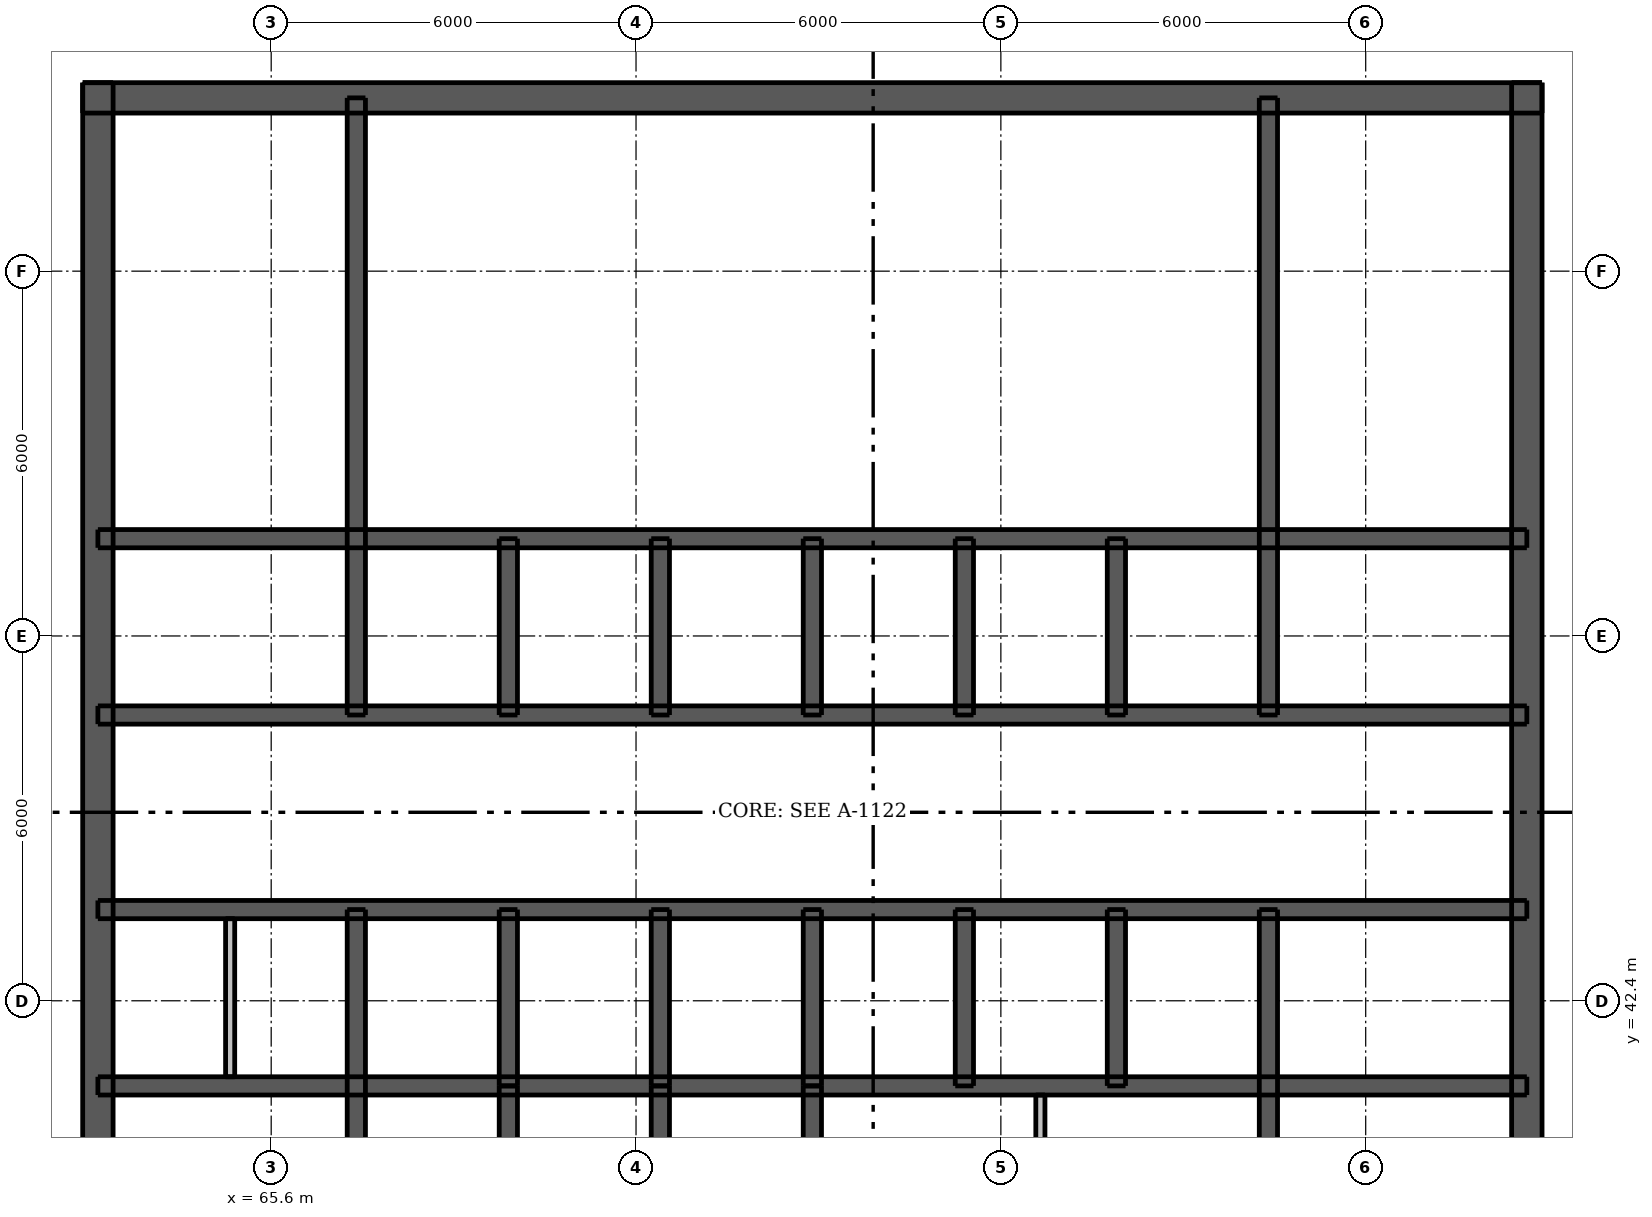
"""IFC4 building model, lengths in metres.
Left out: names, types, materials, properties, quantities, classifications, styles, units other than length and angle.
Written with IfcOpenShell. Run it as: python <this file> out.ifc"""

import sys

from ifc_helpers import new_model, si_unit, direction, frame, frame_2d, origin, place, context, subcontext, project, spatial, rectangle, extrude, element, fill, save


model = new_model("IFC4")
c1 = context("Model", 3, precision=1e-05, world=origin(), true_north=direction((0.0, 1.0)))
c2 = subcontext(c1, "Body", "Model", "MODEL_VIEW")
j1 = project(units=[si_unit("LENGTHUNIT", "METRE"), si_unit("PLANEANGLEUNIT", "RADIAN")], contexts=[c1])
p1 = place(None, origin())
s1 = spatial("IfcSite", under=j1, at=p1, CompositionType="ELEMENT")
p2 = place(p1, origin())
s2 = spatial("IfcBuilding", under=s1, at=p2, CompositionType="ELEMENT")
p3 = place(p2, frame((0.0, 0.0, 281.8)))
s3 = spatial("IfcBuildingStorey", under=s2, at=p3, CompositionType="ELEMENT", Elevation=281.8)
p4 = place(p3, frame((62.5, 57.25, 0.0), z_axis=(0.0, 0.0, 1.0), x_axis=(1.0, 0.0, 0.0)))
e1 = element("IfcWall", 1, at=p4, inside=s3, PredefinedType="SHEAR", context=c2, shape_type="SweptSolid", body=[
    extrude(rectangle(XDim=24.0, YDim=0.5, at=frame_2d((12.0, 0.0))), origin(), (0.0, 0.0, 1.0), 4.2),
])
p5 = place(p4, frame((21.025, 0.0, 0.0)))
e2 = element("IfcOpeningElement", 2, at=p5, cuts=e1, PredefinedType="OPENING", context=c2, shape_type="SweptSolid", body=[
    extrude(rectangle(XDim=1.1, YDim=2.1, at=frame_2d((0.55, 1.05))), frame((0.0, 0.26, 0.0), z_axis=(0.0, -1.0, 0.0), x_axis=(1.0, 0.0, 0.0)), (0.0, 0.0, 1.0), 0.52),
])
p6 = place(p4, frame((1.875, 0.0, 0.0)))
e3 = element("IfcOpeningElement", 3, at=p6, cuts=e1, PredefinedType="OPENING", context=c2, shape_type="SweptSolid", body=[
    extrude(rectangle(XDim=1.1, YDim=2.1, at=frame_2d((0.55, 1.05))), frame((0.0, 0.26, 0.0), z_axis=(0.0, -1.0, 0.0), x_axis=(1.0, 0.0, 0.0)), (0.0, 0.0, 1.0), 0.52),
])
p7 = place(p4, frame((11.55, 0.0, 0.0)))
e4 = element("IfcOpeningElement", 4, at=p7, cuts=e1, PredefinedType="OPENING", context=c2, shape_type="SweptSolid", body=[
    extrude(rectangle(XDim=0.9, YDim=2.1, at=frame_2d((0.45, 1.05))), frame((0.0, 0.26, 0.0), z_axis=(0.0, -1.0, 0.0), x_axis=(1.0, 0.0, 0.0)), (0.0, 0.0, 1.0), 0.52),
])
p8 = place(p3, frame((62.75, 33.5, 0.0), z_axis=(0.0, 0.0, 1.0), x_axis=(0.0, 1.0, 0.0)))
e5 = element("IfcWall", 5, at=p8, inside=s3, PredefinedType="SHEAR", context=c2, shape_type="SweptSolid", body=[
    extrude(rectangle(XDim=24.0, YDim=0.5, at=frame_2d((12.0, 0.0))), origin(), (0.0, 0.0, 1.0), 4.2),
])
p9 = place(p8, frame((11.2, 0.0, 0.0)))
e6 = element("IfcOpeningElement", 6, at=p9, cuts=e5, PredefinedType="OPENING", context=c2, shape_type="SweptSolid", body=[
    extrude(rectangle(XDim=1.6, YDim=2.1, at=frame_2d((0.8, 1.05))), frame((0.0, 0.26, 0.0), z_axis=(0.0, -1.0, 0.0), x_axis=(1.0, 0.0, 0.0)), (0.0, 0.0, 1.0), 0.52),
])
p10 = place(p3, frame((86.25, 33.5, 0.0), z_axis=(0.0, 0.0, 1.0), x_axis=(0.0, 1.0, 0.0)))
e7 = element("IfcWall", 7, at=p10, inside=s3, PredefinedType="SHEAR", context=c2, shape_type="SweptSolid", body=[
    extrude(rectangle(XDim=24.0, YDim=0.5, at=frame_2d((12.0, 0.0))), origin(), (0.0, 0.0, 1.0), 4.2),
])
p11 = place(p10, frame((11.2, 0.0, 0.0)))
e8 = element("IfcOpeningElement", 8, at=p11, cuts=e7, PredefinedType="OPENING", context=c2, shape_type="SweptSolid", body=[
    extrude(rectangle(XDim=1.6, YDim=2.1, at=frame_2d((0.8, 1.05))), frame((0.0, 0.26, 0.0), z_axis=(0.0, -1.0, 0.0), x_axis=(1.0, 0.0, 0.0)), (0.0, 0.0, 1.0), 0.52),
])
p12 = place(p3, frame((62.75, 41.0, 0.0), z_axis=(0.0, 0.0, 1.0), x_axis=(1.0, 0.0, 0.0)))
e9 = element("IfcWall", 9, at=p12, inside=s3, PredefinedType="SHEAR", context=c2, shape_type="SweptSolid", body=[
    extrude(rectangle(XDim=23.5, YDim=0.3, at=frame_2d((11.75, 0.0))), origin(), (0.0, 0.0, 1.0), 4.2),
])
p13 = place(p3, frame((62.75, 43.9, 0.0), z_axis=(0.0, 0.0, 1.0), x_axis=(1.0, 0.0, 0.0)))
e10 = element("IfcWall", 10, at=p13, inside=s3, PredefinedType="SHEAR", context=c2, shape_type="SweptSolid", body=[
    extrude(rectangle(XDim=23.5, YDim=0.3, at=frame_2d((11.75, 0.0))), origin(), (0.0, 0.0, 1.0), 4.2),
])
p14 = place(p13, frame((0.762, 0.0, 0.0)))
e11 = element("IfcOpeningElement", 11, at=p14, cuts=e10, PredefinedType="OPENING", context=c2, shape_type="SweptSolid", body=[
    extrude(rectangle(XDim=0.9, YDim=2.1, at=frame_2d((0.45, 1.05))), frame((0.0, 0.16, 0.0), z_axis=(0.0, -1.0, 0.0), x_axis=(1.0, 0.0, 0.0)), (0.0, 0.0, 1.0), 0.32),
])
p15 = place(p13, frame((2.688, 0.0, 0.0)))
e12 = element("IfcOpeningElement", 12, at=p15, cuts=e10, PredefinedType="OPENING", context=c2, shape_type="SweptSolid", body=[
    extrude(rectangle(XDim=0.9, YDim=2.1, at=frame_2d((0.45, 1.05))), frame((0.0, 0.16, 0.0), z_axis=(0.0, -1.0, 0.0), x_axis=(1.0, 0.0, 0.0)), (0.0, 0.0, 1.0), 0.32),
])
p16 = place(p13, frame((20.875, 0.0, 0.0)))
e13 = element("IfcOpeningElement", 13, at=p16, cuts=e10, PredefinedType="OPENING", context=c2, shape_type="SweptSolid", body=[
    extrude(rectangle(XDim=0.9, YDim=2.1, at=frame_2d((0.45, 1.05))), frame((0.0, 0.16, 0.0), z_axis=(0.0, -1.0, 0.0), x_axis=(1.0, 0.0, 0.0)), (0.0, 0.0, 1.0), 0.32),
])
p17 = place(p13, frame((7.55, 0.0, 0.0)))
e14 = element("IfcOpeningElement", 14, at=p17, cuts=e10, PredefinedType="OPENING", context=c2, shape_type="SweptSolid", body=[
    extrude(rectangle(XDim=0.9, YDim=2.1, at=frame_2d((0.45, 1.05))), frame((0.0, 0.16, 0.0), z_axis=(0.0, -1.0, 0.0), x_axis=(1.0, 0.0, 0.0)), (0.0, 0.0, 1.0), 0.32),
])
p18 = place(p13, frame((10.05, 0.0, 0.0)))
e15 = element("IfcOpeningElement", 15, at=p18, cuts=e10, PredefinedType="OPENING", context=c2, shape_type="SweptSolid", body=[
    extrude(rectangle(XDim=0.9, YDim=2.1, at=frame_2d((0.45, 1.05))), frame((0.0, 0.16, 0.0), z_axis=(0.0, -1.0, 0.0), x_axis=(1.0, 0.0, 0.0)), (0.0, 0.0, 1.0), 0.32),
])
p19 = place(p13, frame((15.05, 0.0, 0.0)))
e16 = element("IfcOpeningElement", 16, at=p19, cuts=e10, PredefinedType="OPENING", context=c2, shape_type="SweptSolid", body=[
    extrude(rectangle(XDim=0.9, YDim=2.1, at=frame_2d((0.45, 1.05))), frame((0.0, 0.16, 0.0), z_axis=(0.0, -1.0, 0.0), x_axis=(1.0, 0.0, 0.0)), (0.0, 0.0, 1.0), 0.32),
])
p20 = place(p13, frame((17.55, 0.0, 0.0)))
e17 = element("IfcOpeningElement", 17, at=p20, cuts=e10, PredefinedType="OPENING", context=c2, shape_type="SweptSolid", body=[
    extrude(rectangle(XDim=0.9, YDim=2.1, at=frame_2d((0.45, 1.05))), frame((0.0, 0.16, 0.0), z_axis=(0.0, -1.0, 0.0), x_axis=(1.0, 0.0, 0.0)), (0.0, 0.0, 1.0), 0.32),
])
p21 = place(p3, frame((62.75, 47.1, 0.0), z_axis=(0.0, 0.0, 1.0), x_axis=(1.0, 0.0, 0.0)))
e18 = element("IfcWall", 18, at=p21, inside=s3, PredefinedType="SHEAR", context=c2, shape_type="SweptSolid", body=[
    extrude(rectangle(XDim=23.5, YDim=0.3, at=frame_2d((11.75, 0.0))), origin(), (0.0, 0.0, 1.0), 4.2),
])
p22 = place(p21, frame((1.725, 0.0, 0.0)))
e19 = element("IfcOpeningElement", 19, at=p22, cuts=e18, PredefinedType="OPENING", context=c2, shape_type="SweptSolid", body=[
    extrude(rectangle(XDim=0.9, YDim=2.1, at=frame_2d((0.45, 1.05))), frame((0.0, 0.16, 0.0), z_axis=(0.0, -1.0, 0.0), x_axis=(1.0, 0.0, 0.0)), (0.0, 0.0, 1.0), 0.32),
])
p23 = place(p21, frame((20.875, 0.0, 0.0)))
e20 = element("IfcOpeningElement", 20, at=p23, cuts=e18, PredefinedType="OPENING", context=c2, shape_type="SweptSolid", body=[
    extrude(rectangle(XDim=0.9, YDim=2.1, at=frame_2d((0.45, 1.05))), frame((0.0, 0.16, 0.0), z_axis=(0.0, -1.0, 0.0), x_axis=(1.0, 0.0, 0.0)), (0.0, 0.0, 1.0), 0.32),
])
p24 = place(p3, frame((62.75, 50.0, 0.0), z_axis=(0.0, 0.0, 1.0), x_axis=(1.0, 0.0, 0.0)))
e21 = element("IfcWall", 21, at=p24, inside=s3, PredefinedType="SHEAR", context=c2, shape_type="SweptSolid", body=[
    extrude(rectangle(XDim=23.5, YDim=0.3, at=frame_2d((11.75, 0.0))), origin(), (0.0, 0.0, 1.0), 4.2),
])
p25 = place(p3, frame((67.0, 33.75, 0.0), z_axis=(0.0, 0.0, 1.0), x_axis=(0.0, 1.0, 0.0)))
e22 = element("IfcWall", 22, at=p25, inside=s3, PredefinedType="SHEAR", context=c2, shape_type="SweptSolid", body=[
    extrude(rectangle(XDim=10.15, YDim=0.3, at=frame_2d((5.075, 0.0))), origin(), (0.0, 0.0, 1.0), 4.2),
])
p26 = place(p25, frame((0.45, 0.0, 0.0)))
e23 = element("IfcOpeningElement", 23, at=p26, cuts=e22, PredefinedType="OPENING", context=c2, shape_type="SweptSolid", body=[
    extrude(rectangle(XDim=1.1, YDim=2.1, at=frame_2d((0.55, 1.05))), frame((0.0, 0.16, 0.0), z_axis=(0.0, -1.0, 0.0), x_axis=(1.0, 0.0, 0.0)), (0.0, 0.0, 1.0), 0.32),
])
for number, where, z_axis, x_axis in (
    (24, (67.0, 47.1, 0.0), (0.0, 0.0, 1.0), (0.0, 1.0, 0.0)),
    (25, (82.0, 33.75, 0.0), (0.0, 0.0, 1.0), (0.0, 1.0, 0.0)),
    (26, (82.0, 47.1, 0.0), (0.0, 0.0, 1.0), (0.0, 1.0, 0.0)),
):
    element("IfcWall", number, at=place(p3, frame(where, z_axis=z_axis, x_axis=x_axis)), inside=s3, PredefinedType="SHEAR", context=c2, shape_type="SweptSolid", body=[
        extrude(rectangle(XDim=10.15, YDim=0.3, at=frame_2d((5.075, 0.0))), origin(), (0.0, 0.0, 1.0), 4.2),
    ])
for number, where, z_axis, x_axis in (
    (27, (69.5, 41.0, 0.0), (0.0, 0.0, 1.0), (0.0, 1.0, 0.0)),
    (28, (69.5, 47.1, 0.0), (0.0, 0.0, 1.0), (0.0, 1.0, 0.0)),
    (29, (72.0, 41.0, 0.0), (0.0, 0.0, 1.0), (0.0, 1.0, 0.0)),
    (30, (72.0, 47.1, 0.0), (0.0, 0.0, 1.0), (0.0, 1.0, 0.0)),
    (31, (74.5, 41.0, 0.0), (0.0, 0.0, 1.0), (0.0, 1.0, 0.0)),
    (32, (74.5, 47.1, 0.0), (0.0, 0.0, 1.0), (0.0, 1.0, 0.0)),
    (33, (77.0, 41.0, 0.0), (0.0, 0.0, 1.0), (0.0, 1.0, 0.0)),
    (34, (77.0, 47.1, 0.0), (0.0, 0.0, 1.0), (0.0, 1.0, 0.0)),
    (35, (79.5, 41.0, 0.0), (0.0, 0.0, 1.0), (0.0, 1.0, 0.0)),
    (36, (79.5, 47.1, 0.0), (0.0, 0.0, 1.0), (0.0, 1.0, 0.0)),
    (37, (69.5, 38.1, 0.0), (0.0, 0.0, 1.0), (0.0, 1.0, 0.0)),
    (38, (72.0, 38.1, 0.0), (0.0, 0.0, 1.0), (0.0, 1.0, 0.0)),
    (39, (74.5, 38.1, 0.0), (0.0, 0.0, 1.0), (0.0, 1.0, 0.0)),
):
    element("IfcWall", number, at=place(p3, frame(where, z_axis=z_axis, x_axis=x_axis)), inside=s3, PredefinedType="SHEAR", context=c2, shape_type="SweptSolid", body=[
        extrude(rectangle(XDim=2.9, YDim=0.3, at=frame_2d((1.45, 0.0))), origin(), (0.0, 0.0, 1.0), 4.2),
    ])
p27 = place(p3, frame((78.25, 34.0, 0.0), z_axis=(0.0, 0.0, 1.0), x_axis=(0.0, 1.0, 0.0)))
e40 = element("IfcWall", 40, at=p27, inside=s3, PredefinedType="PLUMBINGWALL", context=c2, shape_type="SweptSolid", body=[
    extrude(rectangle(XDim=6.85, YDim=0.15, at=frame_2d((3.425, 0.0))), origin(), (0.0, 0.0, 1.0), 4.2),
])
p28 = place(p3, frame((64.925, 41.15, 0.0), z_axis=(0.0, 0.0, 1.0), x_axis=(0.0, 1.0, 0.0)))
e41 = element("IfcWall", 41, at=p28, inside=s3, PredefinedType="PLUMBINGWALL", context=c2, shape_type="SweptSolid", body=[
    extrude(rectangle(XDim=2.6, YDim=0.15, at=frame_2d((1.3, 0.0))), origin(), (0.0, 0.0, 1.0), 4.2),
])
p29 = place(p5, origin())
e42 = element("IfcDoor", 42, at=p29, inside=s3, OperationType="SINGLE_SWING_RIGHT", PredefinedType="DOOR", context=c2, shape_type="SweptSolid", body=[
    extrude(rectangle(XDim=1.1, YDim=2.1, at=frame_2d((0.55, 1.05))), frame((0.0, -0.188, 0.0), z_axis=(0.0, -1.0, 0.0), x_axis=(1.0, 0.0, 0.0)), (0.0, 0.0, 1.0), 0.05),
])
fill(e2, e42)
p30 = place(p6, origin())
e43 = element("IfcDoor", 43, at=p30, inside=s3, OperationType="SINGLE_SWING_LEFT", PredefinedType="DOOR", context=c2, shape_type="SweptSolid", body=[
    extrude(rectangle(XDim=1.1, YDim=2.1, at=frame_2d((0.55, 1.05))), frame((0.0, -0.188, 0.0), z_axis=(0.0, -1.0, 0.0), x_axis=(1.0, 0.0, 0.0)), (0.0, 0.0, 1.0), 0.05),
])
fill(e3, e43)
p31 = place(p9, origin())
e44 = element("IfcDoor", 44, at=p31, inside=s3, OperationType="DOUBLE_DOOR_SINGLE_SWING", PredefinedType="DOOR", context=c2, shape_type="SweptSolid", body=[
    extrude(rectangle(XDim=1.6, YDim=2.1, at=frame_2d((0.8, 1.05))), frame((0.0, -0.188, 0.0), z_axis=(0.0, -1.0, 0.0), x_axis=(1.0, 0.0, 0.0)), (0.0, 0.0, 1.0), 0.05),
])
fill(e6, e44)
p32 = place(p11, origin())
e45 = element("IfcDoor", 45, at=p32, inside=s3, OperationType="DOUBLE_DOOR_SINGLE_SWING", PredefinedType="DOOR", context=c2, shape_type="SweptSolid", body=[
    extrude(rectangle(XDim=1.6, YDim=2.1, at=frame_2d((0.8, 1.05))), frame((0.0, 0.237, 0.0), z_axis=(0.0, -1.0, 0.0), x_axis=(1.0, 0.0, 0.0)), (0.0, 0.0, 1.0), 0.05),
])
fill(e8, e45)
p33 = place(p14, origin())
e46 = element("IfcDoor", 46, at=p33, inside=s3, OperationType="SINGLE_SWING_LEFT", PredefinedType="DOOR", context=c2, shape_type="SweptSolid", body=[
    extrude(rectangle(XDim=0.9, YDim=2.1, at=frame_2d((0.45, 1.05))), frame((0.0, -0.087, 0.0), z_axis=(0.0, -1.0, 0.0), x_axis=(1.0, 0.0, 0.0)), (0.0, 0.0, 1.0), 0.05),
])
fill(e11, e46)
p34 = place(p15, origin())
e47 = element("IfcDoor", 47, at=p34, inside=s3, OperationType="SINGLE_SWING_RIGHT", PredefinedType="DOOR", context=c2, shape_type="SweptSolid", body=[
    extrude(rectangle(XDim=0.9, YDim=2.1, at=frame_2d((0.45, 1.05))), frame((0.0, -0.087, 0.0), z_axis=(0.0, -1.0, 0.0), x_axis=(1.0, 0.0, 0.0)), (0.0, 0.0, 1.0), 0.05),
])
fill(e12, e47)
p35 = place(p16, origin())
e48 = element("IfcDoor", 48, at=p35, inside=s3, OperationType="SINGLE_SWING_LEFT", PredefinedType="DOOR", context=c2, shape_type="SweptSolid", body=[
    extrude(rectangle(XDim=0.9, YDim=2.1, at=frame_2d((0.45, 1.05))), frame((0.0, -0.087, 0.0), z_axis=(0.0, -1.0, 0.0), x_axis=(1.0, 0.0, 0.0)), (0.0, 0.0, 1.0), 0.05),
])
fill(e13, e48)
p36 = place(p22, origin())
e49 = element("IfcDoor", 49, at=p36, inside=s3, OperationType="SINGLE_SWING_LEFT", PredefinedType="DOOR", context=c2, shape_type="SweptSolid", body=[
    extrude(rectangle(XDim=0.9, YDim=2.1, at=frame_2d((0.45, 1.05))), frame((0.0, 0.138, 0.0), z_axis=(0.0, -1.0, 0.0), x_axis=(1.0, 0.0, 0.0)), (0.0, 0.0, 1.0), 0.05),
])
fill(e19, e49)
p37 = place(p23, origin())
e50 = element("IfcDoor", 50, at=p37, inside=s3, OperationType="SINGLE_SWING_LEFT", PredefinedType="DOOR", context=c2, shape_type="SweptSolid", body=[
    extrude(rectangle(XDim=0.9, YDim=2.1, at=frame_2d((0.45, 1.05))), frame((0.0, 0.138, 0.0), z_axis=(0.0, -1.0, 0.0), x_axis=(1.0, 0.0, 0.0)), (0.0, 0.0, 1.0), 0.05),
])
fill(e20, e50)
p38 = place(p7, origin())
e51 = element("IfcDoor", 51, at=p38, inside=s3, OperationType="SINGLE_SWING_RIGHT", PredefinedType="DOOR", context=c2, shape_type="SweptSolid", body=[
    extrude(rectangle(XDim=0.9, YDim=2.1, at=frame_2d((0.45, 1.05))), frame((0.0, -0.188, 0.0), z_axis=(0.0, -1.0, 0.0), x_axis=(1.0, 0.0, 0.0)), (0.0, 0.0, 1.0), 0.05),
])
fill(e4, e51)
p39 = place(p17, origin())
e52 = element("IfcDoor", 52, at=p39, inside=s3, OperationType="SINGLE_SWING_LEFT", PredefinedType="DOOR", context=c2, shape_type="SweptSolid", body=[
    extrude(rectangle(XDim=0.9, YDim=2.1, at=frame_2d((0.45, 1.05))), frame((0.0, -0.087, 0.0), z_axis=(0.0, -1.0, 0.0), x_axis=(1.0, 0.0, 0.0)), (0.0, 0.0, 1.0), 0.05),
])
fill(e14, e52)
p40 = place(p18, origin())
e53 = element("IfcDoor", 53, at=p40, inside=s3, OperationType="SINGLE_SWING_RIGHT", PredefinedType="DOOR", context=c2, shape_type="SweptSolid", body=[
    extrude(rectangle(XDim=0.9, YDim=2.1, at=frame_2d((0.45, 1.05))), frame((0.0, -0.087, 0.0), z_axis=(0.0, -1.0, 0.0), x_axis=(1.0, 0.0, 0.0)), (0.0, 0.0, 1.0), 0.05),
])
fill(e15, e53)
p41 = place(p19, origin())
e54 = element("IfcDoor", 54, at=p41, inside=s3, OperationType="SINGLE_SWING_RIGHT", PredefinedType="DOOR", context=c2, shape_type="SweptSolid", body=[
    extrude(rectangle(XDim=0.9, YDim=2.1, at=frame_2d((0.45, 1.05))), frame((0.0, -0.087, 0.0), z_axis=(0.0, -1.0, 0.0), x_axis=(1.0, 0.0, 0.0)), (0.0, 0.0, 1.0), 0.05),
])
fill(e16, e54)
p42 = place(p20, origin())
e55 = element("IfcDoor", 55, at=p42, inside=s3, OperationType="SINGLE_SWING_LEFT", PredefinedType="DOOR", context=c2, shape_type="SweptSolid", body=[
    extrude(rectangle(XDim=0.9, YDim=2.1, at=frame_2d((0.45, 1.05))), frame((0.0, -0.087, 0.0), z_axis=(0.0, -1.0, 0.0), x_axis=(1.0, 0.0, 0.0)), (0.0, 0.0, 1.0), 0.05),
])
fill(e17, e55)
save(model, sys.argv[1])
